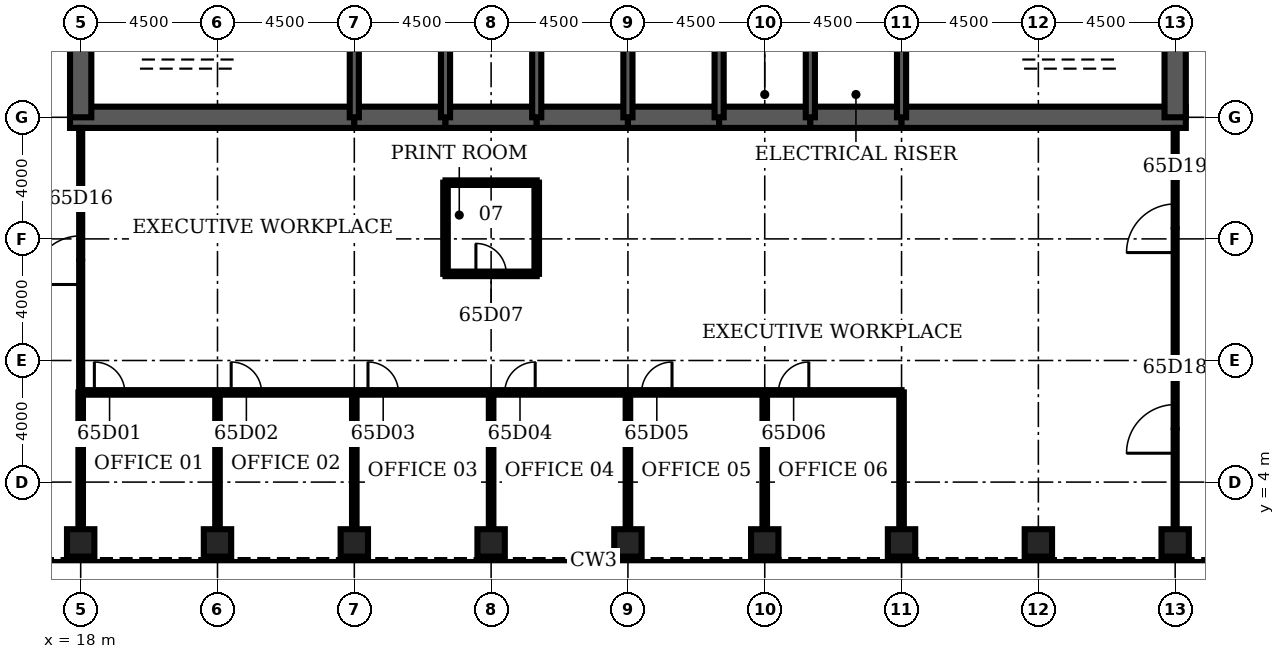
"""IFC4 building model, lengths in metres.
Left out: names, types, materials, properties, quantities, classifications, styles, units other than length and angle.
Written with IfcOpenShell. Run it as: python <this file> out.ifc"""

import sys

from ifc_helpers import new_model, si_unit, direction, frame, frame_2d, origin, origin_2d, place, context, subcontext, project, spatial, rectangle, hollow_rectangle, extrude, element, fill, save


model = new_model("IFC4")
c1 = context("Model", 3, precision=1e-05, world=origin(), true_north=direction((0.0, 1.0)))
c2 = subcontext(c1, "Body", "Model", "MODEL_VIEW")
j1 = project(units=[si_unit("LENGTHUNIT", "METRE"), si_unit("PLANEANGLEUNIT", "RADIAN")], contexts=[c1])
p1 = place(None, origin())
s1 = spatial("IfcSite", under=j1, at=p1, CompositionType="ELEMENT")
p2 = place(p1, origin())
s2 = spatial("IfcBuilding", under=s1, at=p2, CompositionType="ELEMENT")
p3 = place(p2, frame((0.0, 0.0, 287.9)))
s3 = spatial("IfcBuildingStorey", under=s2, at=p3, CompositionType="ELEMENT", Elevation=287.9)
for number, where, z_axis, x_axis in (
    (1, (18.0, 2.0, 0.0), (0.0, 0.0, 1.0), (0.0, 1.0, 0.0)),
    (2, (22.5, 2.0, 0.0), (0.0, 0.0, 1.0), (0.0, 1.0, 0.0)),
    (3, (27.0, 2.0, 0.0), (0.0, 0.0, 1.0), (0.0, 1.0, 0.0)),
    (4, (31.5, 2.0, 0.0), (0.0, 0.0, 1.0), (0.0, 1.0, 0.0)),
    (5, (36.0, 2.0, 0.0), (0.0, 0.0, 1.0), (0.0, 1.0, 0.0)),
    (6, (40.5, 2.0, 0.0), (0.0, 0.0, 1.0), (0.0, 1.0, 0.0)),
    (7, (45.0, 2.0, 0.0), (0.0, 0.0, 1.0), (0.0, 1.0, 0.0)),
    (8, (49.5, 2.0, 0.0), (0.0, 0.0, 1.0), (0.0, 1.0, 0.0)),
    (9, (54.0, 2.0, 0.0), (0.0, 0.0, 1.0), (0.0, 1.0, 0.0)),
):
    element("IfcColumn", number, at=place(p3, frame(where, z_axis=z_axis, x_axis=x_axis)), inside=s3, PredefinedType="COLUMN", context=c2, shape_type="SweptSolid", body=[
        extrude(hollow_rectangle(XDim=0.9, YDim=0.9, WallThickness=0.07, at=origin_2d()), origin(), (0.0, 0.0, 1.0), 4.2),
    ])
p4 = place(p3, frame((17.65, 16.0, 0.0), z_axis=(0.0, 0.0, 1.0), x_axis=(1.0, 0.0, 0.0)))
e10 = element("IfcWall", 10, at=p4, inside=s3, PredefinedType="SHEAR", context=c2, shape_type="SweptSolid", body=[
    extrude(rectangle(XDim=9.35, YDim=0.7, at=frame_2d((4.675, 0.0))), origin(), (0.0, 0.0, 1.0), 4.2),
])
for number, where, z_axis, x_axis in (
    (11, (27.0, 16.0, 0.0), (0.0, 0.0, 1.0), (1.0, 0.0, 0.0)),
    (12, (30.0, 16.0, 0.0), (0.0, 0.0, 1.0), (1.0, 0.0, 0.0)),
    (13, (33.0, 16.0, 0.0), (0.0, 0.0, 1.0), (1.0, 0.0, 0.0)),
    (14, (36.0, 16.0, 0.0), (0.0, 0.0, 1.0), (1.0, 0.0, 0.0)),
    (15, (39.0, 16.0, 0.0), (0.0, 0.0, 1.0), (1.0, 0.0, 0.0)),
    (16, (42.0, 16.0, 0.0), (0.0, 0.0, 1.0), (1.0, 0.0, 0.0)),
):
    element("IfcWall", number, at=place(p3, frame(where, z_axis=z_axis, x_axis=x_axis)), inside=s3, PredefinedType="SHEAR", context=c2, shape_type="SweptSolid", body=[
        extrude(rectangle(XDim=3.0, YDim=0.7, at=frame_2d((1.5, 0.0))), origin(), (0.0, 0.0, 1.0), 4.2),
    ])
p5 = place(p3, frame((45.0, 16.0, 0.0), z_axis=(0.0, 0.0, 1.0), x_axis=(1.0, 0.0, 0.0)))
e17 = element("IfcWall", 17, at=p5, inside=s3, PredefinedType="SHEAR", context=c2, shape_type="SweptSolid", body=[
    extrude(rectangle(XDim=9.35, YDim=0.7, at=frame_2d((4.675, 0.0))), origin(), (0.0, 0.0, 1.0), 4.2),
])
for number, where, z_axis, x_axis in (
    (18, (18.0, 19.2, 0.0), (0.0, 0.0, 1.0), (0.0, -1.0, 0.0)),
    (19, (54.0, 16.0, 0.0), (0.0, 0.0, 1.0), (0.0, 1.0, 0.0)),
):
    element("IfcWall", number, at=place(p3, frame(where, z_axis=z_axis, x_axis=x_axis)), inside=s3, PredefinedType="SHEAR", context=c2, shape_type="SweptSolid", body=[
        extrude(rectangle(XDim=3.2, YDim=0.7, at=frame_2d((1.6, 0.0))), origin(), (0.0, 0.0, 1.0), 4.2),
    ])
for number, where, z_axis, x_axis in (
    (20, (27.0, 16.0, 0.0), (0.0, 0.0, 1.0), (0.0, 1.0, 0.0)),
    (21, (30.0, 16.0, 0.0), (0.0, 0.0, 1.0), (0.0, 1.0, 0.0)),
    (22, (33.0, 16.0, 0.0), (0.0, 0.0, 1.0), (0.0, 1.0, 0.0)),
    (23, (36.0, 16.0, 0.0), (0.0, 0.0, 1.0), (0.0, 1.0, 0.0)),
    (24, (39.0, 16.0, 0.0), (0.0, 0.0, 1.0), (0.0, 1.0, 0.0)),
    (25, (42.0, 16.0, 0.0), (0.0, 0.0, 1.0), (0.0, 1.0, 0.0)),
    (26, (45.0, 16.0, 0.0), (0.0, 0.0, 1.0), (0.0, 1.0, 0.0)),
):
    element("IfcWall", number, at=place(p3, frame(where, z_axis=z_axis, x_axis=x_axis)), inside=s3, PredefinedType="SOLIDWALL", context=c2, shape_type="SweptSolid", body=[
        extrude(rectangle(XDim=3.2, YDim=0.3, at=frame_2d((1.6, 0.0))), origin(), (0.0, 0.0, 1.0), 4.2),
    ])
p6 = place(p3, frame((39.15, 17.3, 0.0), z_axis=(0.0, 0.0, 1.0), x_axis=(1.0, 0.0, 0.0)))
e27 = element("IfcWall", 27, at=p6, inside=s3, PredefinedType="SOLIDWALL", context=c2, shape_type="SweptSolid", body=[
    extrude(rectangle(XDim=2.7, YDim=0.3, at=frame_2d((1.35, 0.0))), origin(), (0.0, 0.0, 1.0), 4.04),
])
p7 = place(p6, frame((0.85, 0.0, 0.0)))
e28 = element("IfcOpeningElement", 28, at=p7, cuts=e27, PredefinedType="OPENING", context=c2, shape_type="SweptSolid", body=[
    extrude(rectangle(XDim=1.0, YDim=2.1, at=frame_2d((0.5, 1.05))), frame((0.0, 0.16, 0.0), z_axis=(0.0, -1.0, 0.0), x_axis=(1.0, 0.0, 0.0)), (0.0, 0.0, 1.0), 0.32),
])
p8 = place(p3, frame((42.15, 17.3, 0.0), z_axis=(0.0, 0.0, 1.0), x_axis=(1.0, 0.0, 0.0)))
e29 = element("IfcWall", 29, at=p8, inside=s3, PredefinedType="SOLIDWALL", context=c2, shape_type="SweptSolid", body=[
    extrude(rectangle(XDim=2.7, YDim=0.3, at=frame_2d((1.35, 0.0))), origin(), (0.0, 0.0, 1.0), 4.04),
])
p9 = place(p8, frame((0.85, 0.0, 0.0)))
e30 = element("IfcOpeningElement", 30, at=p9, cuts=e29, PredefinedType="OPENING", context=c2, shape_type="SweptSolid", body=[
    extrude(rectangle(XDim=1.0, YDim=2.1, at=frame_2d((0.5, 1.05))), frame((0.0, 0.16, 0.0), z_axis=(0.0, -1.0, 0.0), x_axis=(1.0, 0.0, 0.0)), (0.0, 0.0, 1.0), 0.32),
])
p10 = place(p3, frame((18.0, 6.95, 0.0), z_axis=(0.0, 0.0, 1.0), x_axis=(1.0, 0.0, 0.0)))
e31 = element("IfcWall", 31, at=p10, inside=s3, PredefinedType="PARTITIONING", context=c2, shape_type="SweptSolid", body=[
    extrude(rectangle(XDim=27.0, YDim=0.15, at=frame_2d((13.5, 0.0))), origin(), (0.0, 0.0, 1.0), 3.0),
])
p11 = place(p10, frame((0.45, 0.0, 0.0)))
e32 = element("IfcOpeningElement", 32, at=p11, cuts=e31, PredefinedType="OPENING", context=c2, shape_type="SweptSolid", body=[
    extrude(rectangle(XDim=1.0, YDim=2.1, at=frame_2d((0.5, 1.05))), frame((0.0, 0.085, 0.0), z_axis=(0.0, -1.0, 0.0), x_axis=(1.0, 0.0, 0.0)), (0.0, 0.0, 1.0), 0.17),
])
p12 = place(p10, frame((4.95, 0.0, 0.0)))
e33 = element("IfcOpeningElement", 33, at=p12, cuts=e31, PredefinedType="OPENING", context=c2, shape_type="SweptSolid", body=[
    extrude(rectangle(XDim=1.0, YDim=2.1, at=frame_2d((0.5, 1.05))), frame((0.0, 0.085, 0.0), z_axis=(0.0, -1.0, 0.0), x_axis=(1.0, 0.0, 0.0)), (0.0, 0.0, 1.0), 0.17),
])
p13 = place(p10, frame((9.45, 0.0, 0.0)))
e34 = element("IfcOpeningElement", 34, at=p13, cuts=e31, PredefinedType="OPENING", context=c2, shape_type="SweptSolid", body=[
    extrude(rectangle(XDim=1.0, YDim=2.1, at=frame_2d((0.5, 1.05))), frame((0.0, 0.085, 0.0), z_axis=(0.0, -1.0, 0.0), x_axis=(1.0, 0.0, 0.0)), (0.0, 0.0, 1.0), 0.17),
])
p14 = place(p10, frame((13.95, 0.0, 0.0)))
e35 = element("IfcOpeningElement", 35, at=p14, cuts=e31, PredefinedType="OPENING", context=c2, shape_type="SweptSolid", body=[
    extrude(rectangle(XDim=1.0, YDim=2.1, at=frame_2d((0.5, 1.05))), frame((0.0, 0.085, 0.0), z_axis=(0.0, -1.0, 0.0), x_axis=(1.0, 0.0, 0.0)), (0.0, 0.0, 1.0), 0.17),
])
p15 = place(p10, frame((18.45, 0.0, 0.0)))
e36 = element("IfcOpeningElement", 36, at=p15, cuts=e31, PredefinedType="OPENING", context=c2, shape_type="SweptSolid", body=[
    extrude(rectangle(XDim=1.0, YDim=2.1, at=frame_2d((0.5, 1.05))), frame((0.0, 0.085, 0.0), z_axis=(0.0, -1.0, 0.0), x_axis=(1.0, 0.0, 0.0)), (0.0, 0.0, 1.0), 0.17),
])
p16 = place(p10, frame((22.95, 0.0, 0.0)))
e37 = element("IfcOpeningElement", 37, at=p16, cuts=e31, PredefinedType="OPENING", context=c2, shape_type="SweptSolid", body=[
    extrude(rectangle(XDim=1.0, YDim=2.1, at=frame_2d((0.5, 1.05))), frame((0.0, 0.085, 0.0), z_axis=(0.0, -1.0, 0.0), x_axis=(1.0, 0.0, 0.0)), (0.0, 0.0, 1.0), 0.17),
])
p17 = place(p3, frame((30.0, 10.85, 0.0), z_axis=(0.0, 0.0, 1.0), x_axis=(1.0, 0.0, 0.0)))
e38 = element("IfcWall", 38, at=p17, inside=s3, PredefinedType="PARTITIONING", context=c2, shape_type="SweptSolid", body=[
    extrude(rectangle(XDim=3.0, YDim=0.15, at=frame_2d((1.5, 0.0))), origin(), (0.0, 0.0, 1.0), 3.0),
])
p18 = place(p17, frame((1.0, 0.0, 0.0)))
e39 = element("IfcOpeningElement", 39, at=p18, cuts=e38, PredefinedType="OPENING", context=c2, shape_type="SweptSolid", body=[
    extrude(rectangle(XDim=1.0, YDim=2.1, at=frame_2d((0.5, 1.05))), frame((0.0, 0.085, 0.0), z_axis=(0.0, -1.0, 0.0), x_axis=(1.0, 0.0, 0.0)), (0.0, 0.0, 1.0), 0.17),
])
p19 = place(p3, frame((30.0, 13.85, 0.0), z_axis=(0.0, 0.0, 1.0), x_axis=(1.0, 0.0, 0.0)))
e40 = element("IfcWall", 40, at=p19, inside=s3, PredefinedType="PARTITIONING", context=c2, shape_type="SweptSolid", body=[
    extrude(rectangle(XDim=3.0, YDim=0.15, at=frame_2d((1.5, 0.0))), origin(), (0.0, 0.0, 1.0), 3.0),
])
p20 = place(p3, frame((18.0, 2.45, 0.0), z_axis=(0.0, 0.0, 1.0), x_axis=(0.0, 1.0, 0.0)))
e41 = element("IfcWall", 41, at=p20, inside=s3, PredefinedType="PARTITIONING", context=c2, shape_type="SweptSolid", body=[
    extrude(rectangle(XDim=4.5, YDim=0.15, at=frame_2d((2.25, 0.0))), origin(), (0.0, 0.0, 1.0), 3.0),
])
p21 = place(p3, frame((18.0, 6.95, 0.0), z_axis=(0.0, 0.0, 1.0), x_axis=(0.0, 1.0, 0.0)))
e42 = element("IfcWall", 42, at=p21, inside=s3, PredefinedType="PARTITIONING", context=c2, shape_type="SweptSolid", body=[
    extrude(rectangle(XDim=8.7, YDim=0.1, at=frame_2d((4.35, 0.0))), origin(), (0.0, 0.0, 1.0), 3.0),
])
p22 = place(p21, frame((3.55, 0.0, 0.0)))
e43 = element("IfcOpeningElement", 43, at=p22, cuts=e42, PredefinedType="OPENING", context=c2, shape_type="SweptSolid", body=[
    extrude(rectangle(XDim=1.6, YDim=2.1, at=frame_2d((0.8, 1.05))), frame((0.0, 0.06, 0.0), z_axis=(0.0, -1.0, 0.0), x_axis=(1.0, 0.0, 0.0)), (0.0, 0.0, 1.0), 0.12),
])
for number, where, z_axis, x_axis in (
    (44, (22.5, 2.45, 0.0), (0.0, 0.0, 1.0), (0.0, 1.0, 0.0)),
    (45, (27.0, 2.45, 0.0), (0.0, 0.0, 1.0), (0.0, 1.0, 0.0)),
):
    element("IfcWall", number, at=place(p3, frame(where, z_axis=z_axis, x_axis=x_axis)), inside=s3, PredefinedType="PARTITIONING", context=c2, shape_type="SweptSolid", body=[
        extrude(rectangle(XDim=4.5, YDim=0.15, at=frame_2d((2.25, 0.0))), origin(), (0.0, 0.0, 1.0), 3.0),
    ])
p23 = place(p3, frame((30.0, 10.85, 0.0), z_axis=(0.0, 0.0, 1.0), x_axis=(0.0, 1.0, 0.0)))
e46 = element("IfcWall", 46, at=p23, inside=s3, PredefinedType="PARTITIONING", context=c2, shape_type="SweptSolid", body=[
    extrude(rectangle(XDim=3.0, YDim=0.15, at=frame_2d((1.5, 0.0))), origin(), (0.0, 0.0, 1.0), 3.0),
])
p24 = place(p3, frame((31.5, 2.45, 0.0), z_axis=(0.0, 0.0, 1.0), x_axis=(0.0, 1.0, 0.0)))
e47 = element("IfcWall", 47, at=p24, inside=s3, PredefinedType="PARTITIONING", context=c2, shape_type="SweptSolid", body=[
    extrude(rectangle(XDim=4.5, YDim=0.15, at=frame_2d((2.25, 0.0))), origin(), (0.0, 0.0, 1.0), 3.0),
])
p25 = place(p3, frame((33.0, 10.85, 0.0), z_axis=(0.0, 0.0, 1.0), x_axis=(0.0, 1.0, 0.0)))
e48 = element("IfcWall", 48, at=p25, inside=s3, PredefinedType="PARTITIONING", context=c2, shape_type="SweptSolid", body=[
    extrude(rectangle(XDim=3.0, YDim=0.15, at=frame_2d((1.5, 0.0))), origin(), (0.0, 0.0, 1.0), 3.0),
])
for number, where, z_axis, x_axis in (
    (49, (36.0, 2.45, 0.0), (0.0, 0.0, 1.0), (0.0, 1.0, 0.0)),
    (50, (40.5, 2.45, 0.0), (0.0, 0.0, 1.0), (0.0, 1.0, 0.0)),
    (51, (45.0, 2.45, 0.0), (0.0, 0.0, 1.0), (0.0, 1.0, 0.0)),
):
    element("IfcWall", number, at=place(p3, frame(where, z_axis=z_axis, x_axis=x_axis)), inside=s3, PredefinedType="PARTITIONING", context=c2, shape_type="SweptSolid", body=[
        extrude(rectangle(XDim=4.5, YDim=0.15, at=frame_2d((2.25, 0.0))), origin(), (0.0, 0.0, 1.0), 3.0),
    ])
p26 = place(p3, frame((54.0, 2.45, 0.0), z_axis=(0.0, 0.0, 1.0), x_axis=(0.0, 1.0, 0.0)))
e52 = element("IfcWall", 52, at=p26, inside=s3, PredefinedType="PARTITIONING", context=c2, shape_type="SweptSolid", body=[
    extrude(rectangle(XDim=13.2, YDim=0.1, at=frame_2d((6.6, 0.0))), origin(), (0.0, 0.0, 1.0), 3.0),
])
p27 = place(p26, frame((2.5, 0.0, 0.0)))
e53 = element("IfcOpeningElement", 53, at=p27, cuts=e52, PredefinedType="OPENING", context=c2, shape_type="SweptSolid", body=[
    extrude(rectangle(XDim=1.6, YDim=2.1, at=frame_2d((0.8, 1.05))), frame((0.0, 0.06, 0.0), z_axis=(0.0, -1.0, 0.0), x_axis=(1.0, 0.0, 0.0)), (0.0, 0.0, 1.0), 0.12),
])
p28 = place(p26, frame((9.1, 0.0, 0.0)))
e54 = element("IfcOpeningElement", 54, at=p28, cuts=e52, PredefinedType="OPENING", context=c2, shape_type="SweptSolid", body=[
    extrude(rectangle(XDim=1.6, YDim=2.1, at=frame_2d((0.8, 1.05))), frame((0.0, 0.06, 0.0), z_axis=(0.0, -1.0, 0.0), x_axis=(1.0, 0.0, 0.0)), (0.0, 0.0, 1.0), 0.12),
])
p29 = place(p7, origin())
e55 = element("IfcDoor", 55, at=p29, inside=s3, OperationType="SINGLE_SWING_LEFT", PredefinedType="DOOR", context=c2, shape_type="SweptSolid", body=[
    extrude(rectangle(XDim=1.0, YDim=2.1, at=frame_2d((0.5, 1.05))), frame((0.0, 0.025, 0.0), z_axis=(0.0, -1.0, 0.0), x_axis=(1.0, 0.0, 0.0)), (0.0, 0.0, 1.0), 0.05),
])
fill(e28, e55)
p30 = place(p9, origin())
e56 = element("IfcDoor", 56, at=p30, inside=s3, OperationType="SINGLE_SWING_LEFT", PredefinedType="DOOR", context=c2, shape_type="SweptSolid", body=[
    extrude(rectangle(XDim=1.0, YDim=2.1, at=frame_2d((0.5, 1.05))), frame((0.0, 0.025, 0.0), z_axis=(0.0, -1.0, 0.0), x_axis=(1.0, 0.0, 0.0)), (0.0, 0.0, 1.0), 0.05),
])
fill(e30, e56)
p31 = place(p11, origin())
e57 = element("IfcDoor", 57, at=p31, inside=s3, OperationType="SINGLE_SWING_LEFT", PredefinedType="DOOR", context=c2, shape_type="SweptSolid", body=[
    extrude(rectangle(XDim=1.0, YDim=2.1, at=frame_2d((0.5, 1.05))), frame((0.0, 0.025, 0.0), z_axis=(0.0, -1.0, 0.0), x_axis=(1.0, 0.0, 0.0)), (0.0, 0.0, 1.0), 0.05),
])
fill(e32, e57)
p32 = place(p12, origin())
e58 = element("IfcDoor", 58, at=p32, inside=s3, OperationType="SINGLE_SWING_LEFT", PredefinedType="DOOR", context=c2, shape_type="SweptSolid", body=[
    extrude(rectangle(XDim=1.0, YDim=2.1, at=frame_2d((0.5, 1.05))), frame((0.0, 0.025, 0.0), z_axis=(0.0, -1.0, 0.0), x_axis=(1.0, 0.0, 0.0)), (0.0, 0.0, 1.0), 0.05),
])
fill(e33, e58)
p33 = place(p13, origin())
e59 = element("IfcDoor", 59, at=p33, inside=s3, OperationType="SINGLE_SWING_LEFT", PredefinedType="DOOR", context=c2, shape_type="SweptSolid", body=[
    extrude(rectangle(XDim=1.0, YDim=2.1, at=frame_2d((0.5, 1.05))), frame((0.0, 0.025, 0.0), z_axis=(0.0, -1.0, 0.0), x_axis=(1.0, 0.0, 0.0)), (0.0, 0.0, 1.0), 0.05),
])
fill(e34, e59)
p34 = place(p14, origin())
e60 = element("IfcDoor", 60, at=p34, inside=s3, OperationType="SINGLE_SWING_RIGHT", PredefinedType="DOOR", context=c2, shape_type="SweptSolid", body=[
    extrude(rectangle(XDim=1.0, YDim=2.1, at=frame_2d((0.5, 1.05))), frame((0.0, 0.025, 0.0), z_axis=(0.0, -1.0, 0.0), x_axis=(1.0, 0.0, 0.0)), (0.0, 0.0, 1.0), 0.05),
])
fill(e35, e60)
p35 = place(p15, origin())
e61 = element("IfcDoor", 61, at=p35, inside=s3, OperationType="SINGLE_SWING_RIGHT", PredefinedType="DOOR", context=c2, shape_type="SweptSolid", body=[
    extrude(rectangle(XDim=1.0, YDim=2.1, at=frame_2d((0.5, 1.05))), frame((0.0, 0.025, 0.0), z_axis=(0.0, -1.0, 0.0), x_axis=(1.0, 0.0, 0.0)), (0.0, 0.0, 1.0), 0.05),
])
fill(e36, e61)
p36 = place(p16, origin())
e62 = element("IfcDoor", 62, at=p36, inside=s3, OperationType="SINGLE_SWING_RIGHT", PredefinedType="DOOR", context=c2, shape_type="SweptSolid", body=[
    extrude(rectangle(XDim=1.0, YDim=2.1, at=frame_2d((0.5, 1.05))), frame((0.0, 0.025, 0.0), z_axis=(0.0, -1.0, 0.0), x_axis=(1.0, 0.0, 0.0)), (0.0, 0.0, 1.0), 0.05),
])
fill(e37, e62)
p37 = place(p18, origin())
e63 = element("IfcDoor", 63, at=p37, inside=s3, OperationType="SINGLE_SWING_LEFT", PredefinedType="DOOR", context=c2, shape_type="SweptSolid", body=[
    extrude(rectangle(XDim=1.0, YDim=2.1, at=frame_2d((0.5, 1.05))), frame((0.0, 0.025, 0.0), z_axis=(0.0, -1.0, 0.0), x_axis=(1.0, 0.0, 0.0)), (0.0, 0.0, 1.0), 0.05),
])
fill(e39, e63)
p38 = place(p22, origin())
e64 = element("IfcDoor", 64, at=p38, inside=s3, OperationType="SINGLE_SWING_LEFT", PredefinedType="DOOR", context=c2, shape_type="SweptSolid", body=[
    extrude(rectangle(XDim=1.6, YDim=2.1, at=frame_2d((0.8, 1.05))), frame((0.0, 0.025, 0.0), z_axis=(0.0, -1.0, 0.0), x_axis=(1.0, 0.0, 0.0)), (0.0, 0.0, 1.0), 0.05),
])
fill(e43, e64)
p39 = place(p27, origin())
e65 = element("IfcDoor", 65, at=p39, inside=s3, OperationType="SINGLE_SWING_LEFT", PredefinedType="DOOR", context=c2, shape_type="SweptSolid", body=[
    extrude(rectangle(XDim=1.6, YDim=2.1, at=frame_2d((0.8, 1.05))), frame((0.0, 0.025, 0.0), z_axis=(0.0, -1.0, 0.0), x_axis=(1.0, 0.0, 0.0)), (0.0, 0.0, 1.0), 0.05),
])
fill(e53, e65)
p40 = place(p28, origin())
e66 = element("IfcDoor", 66, at=p40, inside=s3, OperationType="SINGLE_SWING_LEFT", PredefinedType="DOOR", context=c2, shape_type="SweptSolid", body=[
    extrude(rectangle(XDim=1.6, YDim=2.1, at=frame_2d((0.8, 1.05))), frame((0.0, 0.025, 0.0), z_axis=(0.0, -1.0, 0.0), x_axis=(1.0, 0.0, 0.0)), (0.0, 0.0, 1.0), 0.05),
])
fill(e54, e66)
save(model, sys.argv[1])
